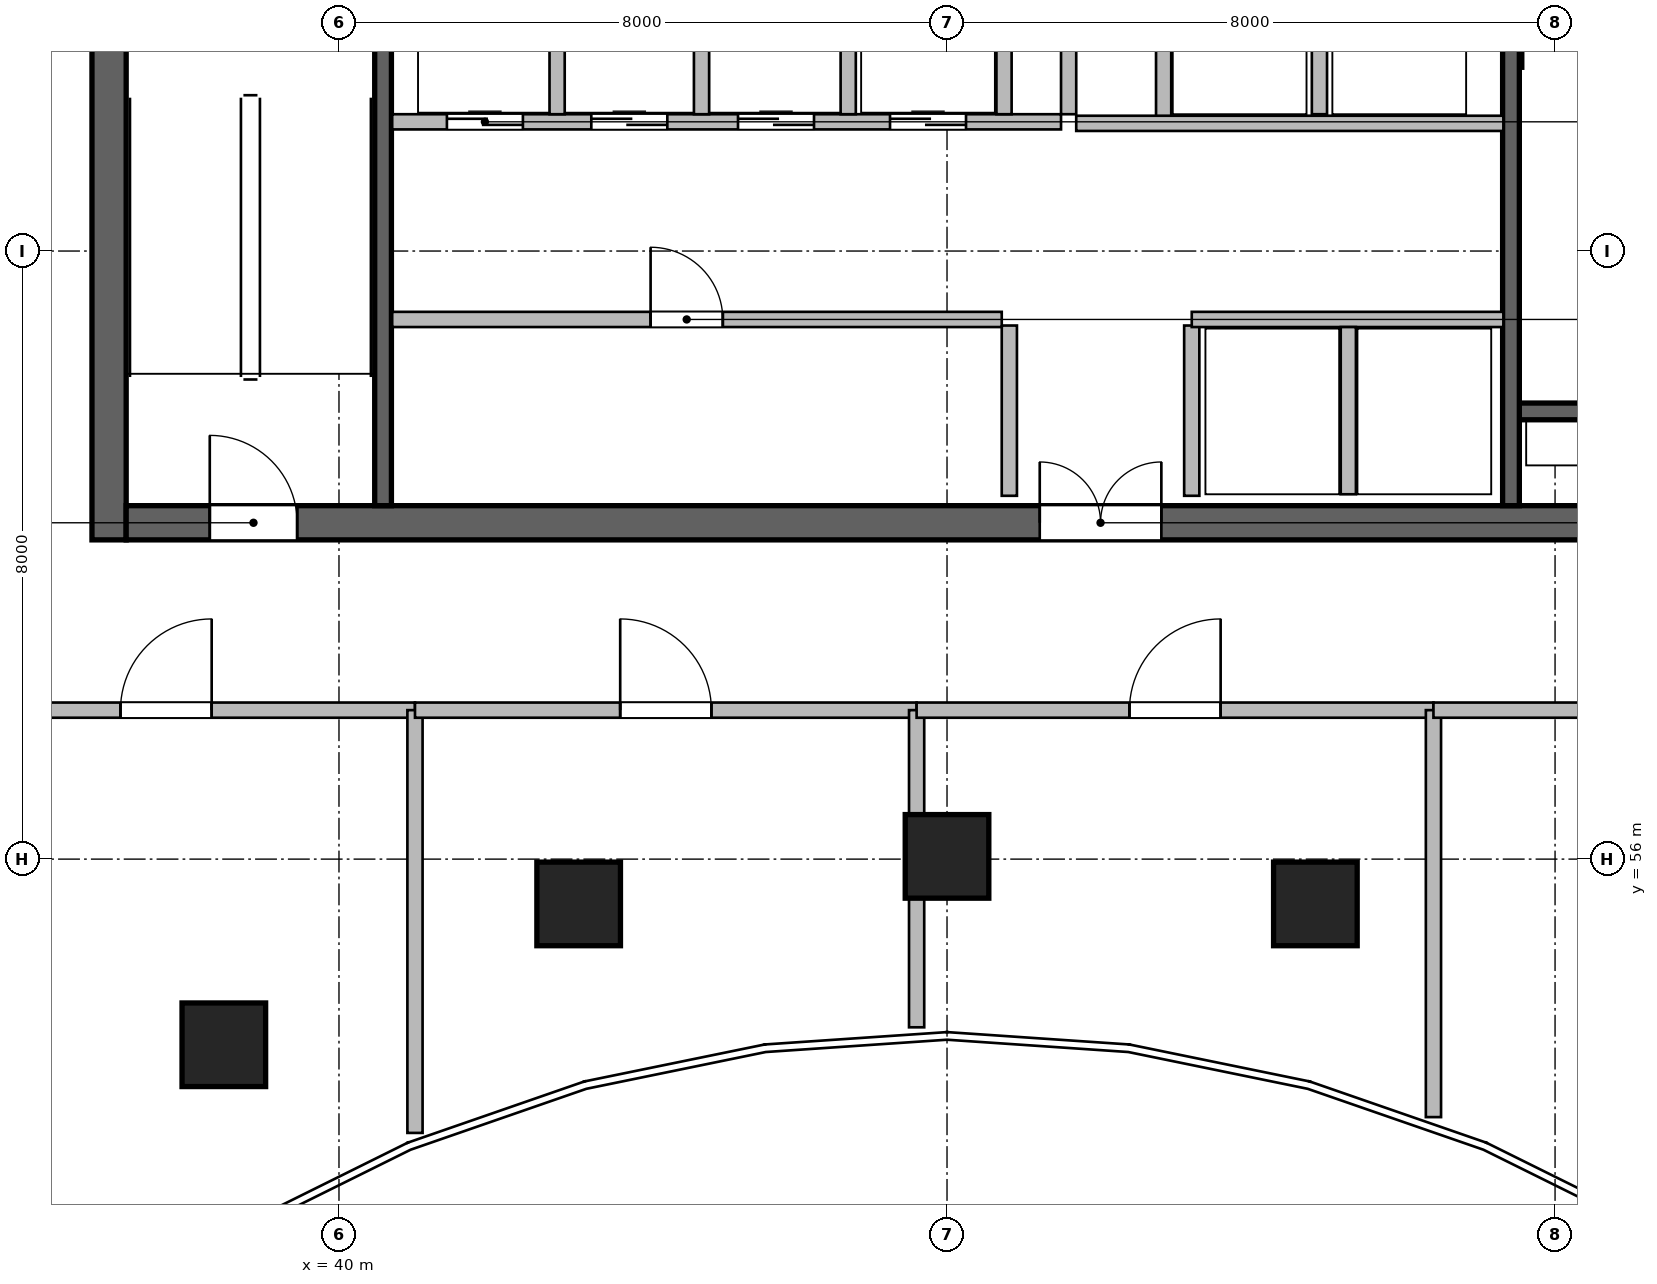
"""IFC4 building model, lengths in metres.
Left out: names, types, materials, properties, quantities, classifications, styles, units other than length and angle.
Written with IfcOpenShell. Run it as: python <this file> out.ifc"""

import sys

from ifc_helpers import new_model, si_unit, direction, frame, frame_2d, origin, origin_2d, place, context, subcontext, project, spatial, rectangle, circle, extrude, source, transform, mapped, element, fill, save


model = new_model("IFC4")
c1 = context("Model", 3, precision=1e-05, world=origin(), true_north=direction((0.0, 1.0)))
c2 = subcontext(c1, "Body", "Model", "MODEL_VIEW")
j1 = project(units=[si_unit("LENGTHUNIT", "METRE"), si_unit("PLANEANGLEUNIT", "RADIAN")], contexts=[c1])
p1 = place(None, origin())
s1 = spatial("IfcSite", under=j1, at=p1, CompositionType="ELEMENT")
p2 = place(p1, origin())
s2 = spatial("IfcBuilding", under=s1, at=p2, CompositionType="ELEMENT")
p3 = place(p2, frame((0.0, 0.0, 189.6)))
s3 = spatial("IfcBuildingStorey", under=s2, at=p3, CompositionType="ELEMENT", Elevation=189.6)
m1 = source(origin(), c2, "Body", "SweptSolid", [
    extrude(rectangle(XDim=12.0, YDim=0.45, at=frame_2d((6.0, 0.0))), origin(), (0.0, 0.0, 1.0), 4.8),
])
p4 = place(p3, frame((36.975, 60.2, 0.0), z_axis=(0.0, 0.0, 1.0), x_axis=(0.0, 1.0, 0.0)))
e1 = element("IfcWall", 1, at=p4, inside=s3, PredefinedType="SHEAR", context=c2, shape_type="MappedRepresentation", body=[
    mapped(m1, transform((0.0, 0.0, 0.0), scale=1.0)),
])
m2 = source(origin(), c2, "Body", "SweptSolid", [
    extrude(rectangle(XDim=21.6, YDim=0.45, at=frame_2d((10.8, 0.0))), origin(), (0.0, 0.0, 1.0), 4.8),
])
p5 = place(p3, frame((37.2, 60.425, 0.0), z_axis=(0.0, 0.0, 1.0), x_axis=(1.0, 0.0, 0.0)))
e2 = element("IfcWall", 2, at=p5, inside=s3, PredefinedType="SHEAR", context=c2, shape_type="MappedRepresentation", body=[
    mapped(m2, transform((0.0, 0.0, 0.0), scale=1.0)),
])
p6 = place(p5, frame((1.1, 0.0, 0.0)))
e3 = element("IfcOpeningElement", 3, at=p6, cuts=e2, PredefinedType="OPENING", context=c2, shape_type="SweptSolid", body=[
    extrude(rectangle(XDim=1.15, YDim=2.15, at=frame_2d((0.575, 1.075))), frame((0.0, 0.235, 0.0), z_axis=(0.0, -1.0, 0.0), x_axis=(1.0, 0.0, 0.0)), (0.0, 0.0, 1.0), 0.47),
])
p7 = place(p5, frame((19.5, 0.0, 0.0)))
e4 = element("IfcOpeningElement", 4, at=p7, cuts=e2, PredefinedType="OPENING", context=c2, shape_type="SweptSolid", body=[
    extrude(rectangle(XDim=0.9, YDim=2.1, at=frame_2d((0.45, 1.05))), frame((0.0, 0.235, 0.0), z_axis=(0.0, -1.0, 0.0), x_axis=(1.0, 0.0, 0.0)), (0.0, 0.0, 1.0), 0.47),
])
p8 = place(p5, frame((12.02, 0.0, 0.0)))
e5 = element("IfcOpeningElement", 5, at=p8, cuts=e2, PredefinedType="OPENING", context=c2, shape_type="SweptSolid", body=[
    extrude(rectangle(XDim=1.6, YDim=2.15, at=frame_2d((0.8, 1.075))), frame((0.0, 0.235, 0.0), z_axis=(0.0, -1.0, 0.0), x_axis=(1.0, 0.0, 0.0)), (0.0, 0.0, 1.0), 0.47),
])
m3 = source(origin(), c2, "Body", "SweptSolid", [
    extrude(rectangle(XDim=3.27, YDim=0.22, at=frame_2d((1.635, 0.0))), origin(), (0.0, 0.0, 1.0), 4.8),
])
p9 = place(p3, frame((55.53, 61.89, 0.0), z_axis=(0.0, 0.0, 1.0), x_axis=(1.0, 0.0, 0.0)))
e6 = element("IfcWall", 6, at=p9, inside=s3, PredefinedType="SHEAR", context=c2, shape_type="MappedRepresentation", body=[
    mapped(m3, transform((0.0, 0.0, 0.0), scale=1.0)),
])
m4 = source(origin(), c2, "Body", "SweptSolid", [
    extrude(rectangle(XDim=11.1, YDim=0.22, at=frame_2d((5.55, 0.0))), origin(), (0.0, 0.0, 1.0), 4.8),
])
p10 = place(p3, frame((40.58, 60.65, 0.0), z_axis=(0.0, 0.0, 1.0), x_axis=(0.0, 1.0, 0.0)))
e7 = element("IfcWall", 7, at=p10, inside=s3, PredefinedType="SHEAR", context=c2, shape_type="MappedRepresentation", body=[
    mapped(m4, transform((0.0, 0.0, 0.0), scale=1.0)),
])
p11 = place(p3, frame((55.42, 60.65, 0.0), z_axis=(0.0, 0.0, 1.0), x_axis=(0.0, 1.0, 0.0)))
e8 = element("IfcWall", 8, at=p11, inside=s3, PredefinedType="SHEAR", context=c2, shape_type="MappedRepresentation", body=[
    mapped(m4, transform((0.0, 0.0, 0.0), scale=1.0)),
])
p12 = place(p11, frame((9.595, 0.0, 0.0)))
e9 = element("IfcOpeningElement", 9, at=p12, cuts=e8, PredefinedType="OPENING", context=c2, shape_type="SweptSolid", body=[
    extrude(rectangle(XDim=1.15, YDim=2.15, at=frame_2d((0.575, 1.075))), frame((0.0, 0.12, 0.0), z_axis=(0.0, -1.0, 0.0), x_axis=(1.0, 0.0, 0.0)), (0.0, 0.0, 1.0), 0.24),
])
m5 = source(origin(), c2, "Body", "SweptSolid", [
    extrude(circle(Radius=0.55, at=origin_2d()), origin(), (0.0, 0.0, 1.0), 4.8),
])
for number, where, z_axis, x_axis in (
    (10, (38.485, 53.558, 0.0), (0.0, 0.0, 1.0), (-0.289, 0.957, 0.0)),
    (11, (43.154, 55.411, 0.0), (0.0, 0.0, 1.0), (-0.143, 0.99, 0.0)),
    (12, (48.0, 56.036, 0.0), (0.0, 0.0, 1.0), (0.0, 1.0, 0.0)),
    (13, (52.846, 55.411, 0.0), (0.0, 0.0, 1.0), (0.143, 0.99, 0.0)),
):
    element("IfcColumn", number, at=place(p3, frame(where, z_axis=z_axis, x_axis=x_axis)), inside=s3, PredefinedType="COLUMN", context=c2, shape_type="MappedRepresentation", body=[
        mapped(m5, transform((0.0, 0.0, 0.0), scale=1.0)),
    ])
m6 = source(origin(), c2, "Body", "SweptSolid", [
    extrude(rectangle(XDim=2.24, YDim=0.2, at=frame_2d((1.12, 0.0))), origin(), (0.0, 0.0, 1.0), 4.48),
])
for number, where, z_axis, x_axis in (
    (14, (48.82, 60.78, 0.0), (0.0, 0.0, 1.0), (0.0, 1.0, 0.0)),
    (15, (51.22, 60.78, 0.0), (0.0, 0.0, 1.0), (0.0, 1.0, 0.0)),
):
    element("IfcWall", number, at=place(p3, frame(where, z_axis=z_axis, x_axis=x_axis)), inside=s3, PredefinedType="SOLIDWALL", context=c2, shape_type="MappedRepresentation", body=[
        mapped(m6, transform((0.0, 0.0, 0.0), scale=1.0)),
    ])
m7 = source(origin(), c2, "Body", "SweptSolid", [
    extrude(rectangle(XDim=5.8, YDim=0.2, at=frame_2d((2.9, 0.0))), origin(), (0.0, 0.0, 1.0), 4.48),
])
p13 = place(p3, frame((49.6, 65.8, 0.0), z_axis=(0.0, 0.0, 1.0), x_axis=(0.0, 1.0, 0.0)))
e16 = element("IfcWall", 16, at=p13, inside=s3, PredefinedType="SOLIDWALL", context=c2, shape_type="MappedRepresentation", body=[
    mapped(m7, transform((0.0, 0.0, 0.0), scale=1.0)),
])
m8 = source(origin(), c2, "Body", "SweptSolid", [
    extrude(rectangle(XDim=2.58, YDim=0.2, at=frame_2d((1.29, 0.0))), origin(), (0.0, 0.0, 1.0), 4.48),
])
p14 = place(p3, frame((50.85, 65.68, 0.0), z_axis=(0.0, 0.0, 1.0), x_axis=(0.0, 1.0, 0.0)))
e17 = element("IfcWall", 17, at=p14, inside=s3, PredefinedType="SOLIDWALL", context=c2, shape_type="MappedRepresentation", body=[
    mapped(m8, transform((0.0, 0.0, 0.0), scale=1.0)),
])
m9 = source(origin(), c2, "Body", "SweptSolid", [
    extrude(rectangle(XDim=2.4, YDim=0.2, at=frame_2d((1.2, 0.0))), origin(), (0.0, 0.0, 1.0), 4.48),
])
p15 = place(p3, frame((52.9, 65.8, 0.0), z_axis=(0.0, 0.0, 1.0), x_axis=(0.0, 1.0, 0.0)))
e18 = element("IfcWall", 18, at=p15, inside=s3, PredefinedType="SOLIDWALL", context=c2, shape_type="MappedRepresentation", body=[
    mapped(m9, transform((0.0, 0.0, 0.0), scale=1.0)),
])
m10 = source(origin(), c2, "Body", "SweptSolid", [
    extrude(rectangle(XDim=5.62, YDim=0.2, at=frame_2d((2.81, 0.0))), origin(), (0.0, 0.0, 1.0), 4.48),
])
p16 = place(p3, frame((49.7, 65.68, 0.0), z_axis=(0.0, 0.0, 1.0), x_axis=(1.0, 0.0, 0.0)))
e19 = element("IfcWall", 19, at=p16, inside=s3, PredefinedType="SOLIDWALL", context=c2, shape_type="MappedRepresentation", body=[
    mapped(m10, transform((0.0, 0.0, 0.0), scale=1.0)),
])
m11 = source(origin(), c2, "Body", "SweptSolid", [
    extrude(rectangle(XDim=8.02, YDim=0.2, at=frame_2d((4.01, 0.0))), origin(), (0.0, 0.0, 1.0), 4.48),
])
p17 = place(p3, frame((40.7, 63.1, 0.0), z_axis=(0.0, 0.0, 1.0), x_axis=(1.0, 0.0, 0.0)))
e20 = element("IfcWall", 20, at=p17, inside=s3, PredefinedType="SOLIDWALL", context=c2, shape_type="MappedRepresentation", body=[
    mapped(m11, transform((0.0, 0.0, 0.0), scale=1.0)),
])
p18 = place(p17, frame((3.4, 0.0, 0.0)))
e21 = element("IfcOpeningElement", 21, at=p18, cuts=e20, PredefinedType="OPENING", context=c2, shape_type="SweptSolid", body=[
    extrude(rectangle(XDim=0.95, YDim=2.15, at=frame_2d((0.475, 1.075))), frame((0.0, 0.11, 0.0), z_axis=(0.0, -1.0, 0.0), x_axis=(1.0, 0.0, 0.0)), (0.0, 0.0, 1.0), 0.22),
])
m12 = source(origin(), c2, "Body", "SweptSolid", [
    extrude(rectangle(XDim=4.1, YDim=0.2, at=frame_2d((2.05, 0.0))), origin(), (0.0, 0.0, 1.0), 4.48),
])
p19 = place(p3, frame((51.22, 63.1, 0.0), z_axis=(0.0, 0.0, 1.0), x_axis=(1.0, 0.0, 0.0)))
e22 = element("IfcWall", 22, at=p19, inside=s3, PredefinedType="SOLIDWALL", context=c2, shape_type="MappedRepresentation", body=[
    mapped(m12, transform((0.0, 0.0, 0.0), scale=1.0)),
])
m13 = source(origin(), c2, "Body", "SweptSolid", [
    extrude(rectangle(XDim=2.2, YDim=0.2, at=frame_2d((1.1, 0.0))), origin(), (0.0, 0.0, 1.0), 4.48),
])
p20 = place(p3, frame((53.28, 60.8, 0.0), z_axis=(0.0, 0.0, 1.0), x_axis=(0.0, 1.0, 0.0)))
e23 = element("IfcWall", 23, at=p20, inside=s3, PredefinedType="SOLIDWALL", context=c2, shape_type="MappedRepresentation", body=[
    mapped(m13, transform((0.0, 0.0, 0.0), scale=1.0)),
])
m14 = source(origin(), c2, "Body", "SweptSolid", [
    extrude(rectangle(XDim=8.8, YDim=0.2, at=frame_2d((4.4, 0.0))), origin(), (0.0, 0.0, 1.0), 4.48),
])
p21 = place(p3, frame((40.7, 65.7, 0.0), z_axis=(0.0, 0.0, 1.0), x_axis=(1.0, 0.0, 0.0)))
e24 = element("IfcWall", 24, at=p21, inside=s3, PredefinedType="SOLIDWALL", context=c2, shape_type="MappedRepresentation", body=[
    mapped(m14, transform((0.0, 0.0, 0.0), scale=1.0)),
])
p22 = place(p21, frame((0.72, 0.0, 0.0)))
e25 = element("IfcOpeningElement", 25, at=p22, cuts=e24, PredefinedType="OPENING", context=c2, shape_type="SweptSolid", body=[
    extrude(rectangle(XDim=1.0, YDim=2.15, at=frame_2d((0.5, 1.075))), frame((0.0, 0.11, 0.0), z_axis=(0.0, -1.0, 0.0), x_axis=(1.0, 0.0, 0.0)), (0.0, 0.0, 1.0), 0.22),
])
p23 = place(p21, frame((2.62, 0.0, 0.0)))
e26 = element("IfcOpeningElement", 26, at=p23, cuts=e24, PredefinedType="OPENING", context=c2, shape_type="SweptSolid", body=[
    extrude(rectangle(XDim=1.0, YDim=2.15, at=frame_2d((0.5, 1.075))), frame((0.0, 0.11, 0.0), z_axis=(0.0, -1.0, 0.0), x_axis=(1.0, 0.0, 0.0)), (0.0, 0.0, 1.0), 0.22),
])
p24 = place(p21, frame((4.55, 0.0, 0.0)))
e27 = element("IfcOpeningElement", 27, at=p24, cuts=e24, PredefinedType="OPENING", context=c2, shape_type="SweptSolid", body=[
    extrude(rectangle(XDim=1.0, YDim=2.15, at=frame_2d((0.5, 1.075))), frame((0.0, 0.11, 0.0), z_axis=(0.0, -1.0, 0.0), x_axis=(1.0, 0.0, 0.0)), (0.0, 0.0, 1.0), 0.22),
])
p25 = place(p21, frame((6.55, 0.0, 0.0)))
e28 = element("IfcOpeningElement", 28, at=p25, cuts=e24, PredefinedType="OPENING", context=c2, shape_type="SweptSolid", body=[
    extrude(rectangle(XDim=1.0, YDim=2.15, at=frame_2d((0.5, 1.075))), frame((0.0, 0.11, 0.0), z_axis=(0.0, -1.0, 0.0), x_axis=(1.0, 0.0, 0.0)), (0.0, 0.0, 1.0), 0.22),
])
for number, where, z_axis, x_axis in (
    (29, (48.75, 65.8, 0.0), (0.0, 0.0, 1.0), (0.0, 1.0, 0.0)),
    (30, (42.87, 65.8, 0.0), (0.0, 0.0, 1.0), (0.0, 1.0, 0.0)),
    (31, (44.77, 65.8, 0.0), (0.0, 0.0, 1.0), (0.0, 1.0, 0.0)),
    (32, (46.7, 65.8, 0.0), (0.0, 0.0, 1.0), (0.0, 1.0, 0.0)),
):
    element("IfcWall", number, at=place(p3, frame(where, z_axis=z_axis, x_axis=x_axis)), inside=s3, PredefinedType="SOLIDWALL", context=c2, shape_type="MappedRepresentation", body=[
        mapped(m9, transform((0.0, 0.0, 0.0), scale=1.0)),
    ])
m15 = source(origin(), c2, "Body", "SweptSolid", [
    extrude(rectangle(XDim=6.55, YDim=0.2, at=frame_2d((3.275, 0.0))), origin(), (0.0, 0.0, 1.0), 4.48),
])
p26 = place(p3, frame((34.45, 57.96, 0.0), z_axis=(0.0, 0.0, 1.0), x_axis=(1.0, 0.0, 0.0)))
e33 = element("IfcWall", 33, at=p26, inside=s3, PredefinedType="SOLIDWALL", context=c2, shape_type="MappedRepresentation", body=[
    mapped(m15, transform((0.0, 0.0, 0.0), scale=1.0)),
])
p27 = place(p26, frame((2.675, 0.0, 0.0)))
e34 = element("IfcOpeningElement", 34, at=p27, cuts=e33, PredefinedType="OPENING", context=c2, shape_type="SweptSolid", body=[
    extrude(rectangle(XDim=1.2, YDim=2.15, at=frame_2d((0.6, 1.075))), frame((0.0, 0.11, 0.0), z_axis=(0.0, -1.0, 0.0), x_axis=(1.0, 0.0, 0.0)), (0.0, 0.0, 1.0), 0.22),
])
m16 = source(origin(), c2, "Body", "SweptSolid", [
    extrude(rectangle(XDim=5.562, YDim=0.2, at=frame_2d((2.781, 0.0))), origin(), (0.0, 0.0, 1.0), 4.48),
])
p28 = place(p3, frame((41.0, 52.398, 0.0), z_axis=(0.0, 0.0, 1.0), x_axis=(0.0, 1.0, 0.0)))
e35 = element("IfcWall", 35, at=p28, inside=s3, PredefinedType="SOLIDWALL", context=c2, shape_type="MappedRepresentation", body=[
    mapped(m16, transform((0.0, 0.0, 0.0), scale=1.0)),
])
m17 = source(origin(), c2, "Body", "SweptSolid", [
    extrude(rectangle(XDim=6.6, YDim=0.2, at=frame_2d((3.3, 0.0))), origin(), (0.0, 0.0, 1.0), 3.925),
])
p29 = place(p3, frame((41.0, 57.96, 0.0), z_axis=(0.0, 0.0, 1.0), x_axis=(1.0, 0.0, 0.0)))
e36 = element("IfcWall", 36, at=p29, inside=s3, PredefinedType="SOLIDWALL", context=c2, shape_type="MappedRepresentation", body=[
    mapped(m17, transform((0.0, 0.0, 0.0), scale=1.0)),
])
p30 = place(p29, frame((2.7, 0.0, 0.0)))
e37 = element("IfcOpeningElement", 37, at=p30, cuts=e36, PredefinedType="OPENING", context=c2, shape_type="SweptSolid", body=[
    extrude(rectangle(XDim=1.2, YDim=2.15, at=frame_2d((0.6, 1.075))), frame((0.0, 0.11, 0.0), z_axis=(0.0, -1.0, 0.0), x_axis=(1.0, 0.0, 0.0)), (0.0, 0.0, 1.0), 0.22),
])
m18 = source(origin(), c2, "Body", "SweptSolid", [
    extrude(rectangle(XDim=4.173, YDim=0.2, at=frame_2d((2.086, 0.0))), origin(), (0.0, 0.0, 1.0), 4.48),
])
p31 = place(p3, frame((47.6, 53.787, 0.0), z_axis=(0.0, 0.0, 1.0), x_axis=(0.0, 1.0, 0.0)))
e38 = element("IfcWall", 38, at=p31, inside=s3, PredefinedType="SOLIDWALL", context=c2, shape_type="MappedRepresentation", body=[
    mapped(m18, transform((0.0, 0.0, 0.0), scale=1.0)),
])
m19 = source(origin(), c2, "Body", "SweptSolid", [
    extrude(rectangle(XDim=6.8, YDim=0.2, at=frame_2d((3.4, 0.0))), origin(), (0.0, 0.0, 1.0), 3.925),
])
p32 = place(p3, frame((47.6, 57.96, 0.0), z_axis=(0.0, 0.0, 1.0), x_axis=(1.0, 0.0, 0.0)))
e39 = element("IfcWall", 39, at=p32, inside=s3, PredefinedType="SOLIDWALL", context=c2, shape_type="MappedRepresentation", body=[
    mapped(m19, transform((0.0, 0.0, 0.0), scale=1.0)),
])
p33 = place(p32, frame((2.8, 0.0, 0.0)))
e40 = element("IfcOpeningElement", 40, at=p33, cuts=e39, PredefinedType="OPENING", context=c2, shape_type="SweptSolid", body=[
    extrude(rectangle(XDim=1.2, YDim=2.15, at=frame_2d((0.6, 1.075))), frame((0.0, 0.11, 0.0), z_axis=(0.0, -1.0, 0.0), x_axis=(1.0, 0.0, 0.0)), (0.0, 0.0, 1.0), 0.22),
])
m20 = source(origin(), c2, "Body", "SweptSolid", [
    extrude(rectangle(XDim=5.354, YDim=0.2, at=frame_2d((2.677, 0.0))), origin(), (0.0, 0.0, 1.0), 4.48),
])
p34 = place(p3, frame((54.4, 52.606, 0.0), z_axis=(0.0, 0.0, 1.0), x_axis=(0.0, 1.0, 0.0)))
e41 = element("IfcWall", 41, at=p34, inside=s3, PredefinedType="SOLIDWALL", context=c2, shape_type="MappedRepresentation", body=[
    mapped(m20, transform((0.0, 0.0, 0.0), scale=1.0)),
])
m21 = source(origin(), c2, "Body", "SweptSolid", [
    extrude(rectangle(XDim=7.15, YDim=0.2, at=frame_2d((3.575, 0.0))), origin(), (0.0, 0.0, 1.0), 3.925),
])
p35 = place(p3, frame((54.4, 57.96, 0.0), z_axis=(0.0, 0.0, 1.0), x_axis=(1.0, 0.0, 0.0)))
e42 = element("IfcWall", 42, at=p35, inside=s3, PredefinedType="SOLIDWALL", context=c2, shape_type="MappedRepresentation", body=[
    mapped(m21, transform((0.0, 0.0, 0.0), scale=1.0)),
])
p36 = place(p35, frame((2.975, 0.0, 0.0)))
e43 = element("IfcOpeningElement", 43, at=p36, cuts=e42, PredefinedType="OPENING", context=c2, shape_type="SweptSolid", body=[
    extrude(rectangle(XDim=1.2, YDim=2.15, at=frame_2d((0.6, 1.075))), frame((0.0, 0.11, 0.0), z_axis=(0.0, -1.0, 0.0), x_axis=(1.0, 0.0, 0.0)), (0.0, 0.0, 1.0), 0.22),
])
m22 = source(origin(), c2, "Body", "SweptSolid", [
    extrude(rectangle(XDim=1.15, YDim=2.15, at=frame_2d((0.575, 1.075))), frame((0.0, 0.025, 0.0), z_axis=(0.0, -1.0, 0.0), x_axis=(1.0, 0.0, 0.0)), (0.0, 0.0, 1.0), 0.05),
])
p37 = place(p6, origin())
e44 = element("IfcDoor", 44, at=p37, inside=s3, OperationType="SINGLE_SWING_LEFT", PredefinedType="DOOR", context=c2, shape_type="MappedRepresentation", body=[
    mapped(m22, transform((0.0, 0.0, 0.0), scale=1.0)),
])
fill(e3, e44)
m23 = source(origin(), c2, "Body", "SweptSolid", [
    extrude(rectangle(XDim=1.6, YDim=2.15, at=frame_2d((0.8, 1.075))), frame((0.0, 0.025, 0.0), z_axis=(0.0, -1.0, 0.0), x_axis=(1.0, 0.0, 0.0)), (0.0, 0.0, 1.0), 0.05),
])
p38 = place(p8, origin())
e45 = element("IfcDoor", 45, at=p38, inside=s3, OperationType="DOUBLE_DOOR_SINGLE_SWING", PredefinedType="DOOR", context=c2, shape_type="MappedRepresentation", body=[
    mapped(m23, transform((0.0, 0.0, 0.0), scale=1.0)),
])
fill(e5, e45)
m24 = source(origin(), c2, "Body", "SweptSolid", [
    extrude(rectangle(XDim=0.95, YDim=2.15, at=frame_2d((0.475, 1.075))), frame((0.0, 0.025, 0.0), z_axis=(0.0, -1.0, 0.0), x_axis=(1.0, 0.0, 0.0)), (0.0, 0.0, 1.0), 0.05),
])
p39 = place(p18, origin())
e46 = element("IfcDoor", 46, at=p39, inside=s3, OperationType="SINGLE_SWING_LEFT", PredefinedType="DOOR", context=c2, shape_type="MappedRepresentation", body=[
    mapped(m24, transform((0.0, 0.0, 0.0), scale=1.0)),
])
fill(e21, e46)
m25 = source(origin(), c2, "Body", "SweptSolid", [
    extrude(rectangle(XDim=1.0, YDim=2.15, at=frame_2d((0.5, 1.075))), frame((0.0, 0.025, 0.0), z_axis=(0.0, -1.0, 0.0), x_axis=(1.0, 0.0, 0.0)), (0.0, 0.0, 1.0), 0.05),
])
p40 = place(p22, origin())
e47 = element("IfcDoor", 47, at=p40, inside=s3, OperationType="DOUBLE_DOOR_SLIDING", PredefinedType="DOOR", context=c2, shape_type="MappedRepresentation", body=[
    mapped(m25, transform((0.0, 0.0, 0.0), scale=1.0)),
])
fill(e25, e47)
p41 = place(p23, origin())
e48 = element("IfcDoor", 48, at=p41, inside=s3, OperationType="DOUBLE_DOOR_SLIDING", PredefinedType="DOOR", context=c2, shape_type="MappedRepresentation", body=[
    mapped(m25, transform((0.0, 0.0, 0.0), scale=1.0)),
])
fill(e26, e48)
p42 = place(p24, origin())
e49 = element("IfcDoor", 49, at=p42, inside=s3, OperationType="DOUBLE_DOOR_SLIDING", PredefinedType="DOOR", context=c2, shape_type="MappedRepresentation", body=[
    mapped(m25, transform((0.0, 0.0, 0.0), scale=1.0)),
])
fill(e27, e49)
p43 = place(p25, origin())
e50 = element("IfcDoor", 50, at=p43, inside=s3, OperationType="DOUBLE_DOOR_SLIDING", PredefinedType="DOOR", context=c2, shape_type="MappedRepresentation", body=[
    mapped(m25, transform((0.0, 0.0, 0.0), scale=1.0)),
])
fill(e28, e50)
m26 = source(origin(), c2, "Body", "SweptSolid", [
    extrude(rectangle(XDim=1.2, YDim=2.15, at=frame_2d((0.6, 1.075))), frame((0.0, 0.025, 0.0), z_axis=(0.0, -1.0, 0.0), x_axis=(1.0, 0.0, 0.0)), (0.0, 0.0, 1.0), 0.05),
])
p44 = place(p27, origin())
e51 = element("IfcDoor", 51, at=p44, inside=s3, OperationType="SINGLE_SWING_RIGHT", PredefinedType="DOOR", context=c2, shape_type="MappedRepresentation", body=[
    mapped(m26, transform((0.0, 0.0, 0.0), scale=1.0)),
])
fill(e34, e51)
p45 = place(p30, origin())
e52 = element("IfcDoor", 52, at=p45, inside=s3, OperationType="SINGLE_SWING_LEFT", PredefinedType="DOOR", context=c2, shape_type="MappedRepresentation", body=[
    mapped(m26, transform((0.0, 0.0, 0.0), scale=1.0)),
])
fill(e37, e52)
p46 = place(p33, origin())
e53 = element("IfcDoor", 53, at=p46, inside=s3, OperationType="SINGLE_SWING_RIGHT", PredefinedType="DOOR", context=c2, shape_type="MappedRepresentation", body=[
    mapped(m26, transform((0.0, 0.0, 0.0), scale=1.0)),
])
fill(e40, e53)
save(model, sys.argv[1])
